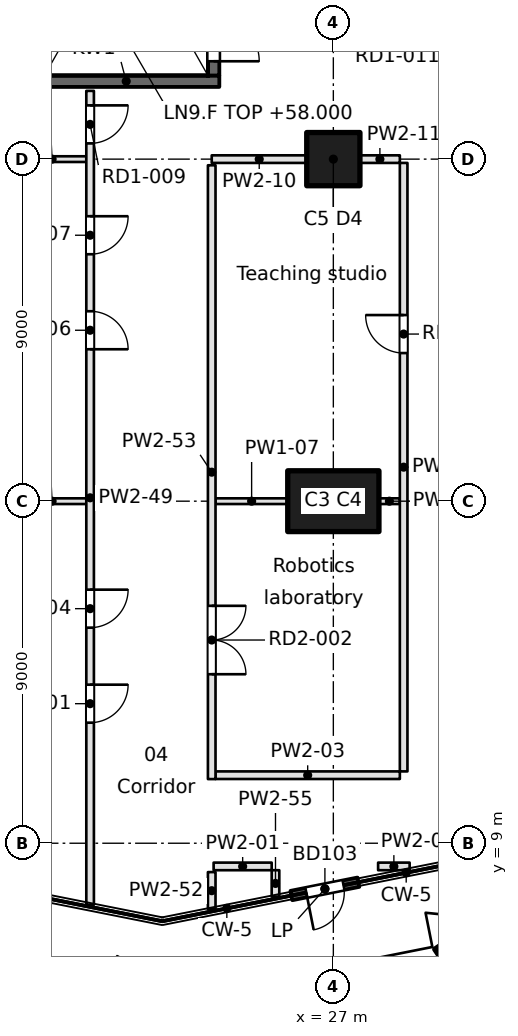
"""IFC4 building model, lengths in metres.
Left out: names, types, materials, properties, quantities, classifications, styles, units other than length and angle.
Written with IfcOpenShell. Run it as: python <this file> out.ifc"""

import sys

from ifc_helpers import new_model, si_unit, direction, frame, frame_2d, origin, origin_2d, place, context, subcontext, project, spatial, rectangle, extrude, element, fill, save


model = new_model("IFC4")
c1 = context("Model", 3, precision=1e-05, world=origin(), true_north=direction((0.0, 1.0)))
c2 = subcontext(c1, "Body", "Model", "MODEL_VIEW")
j1 = project(units=[si_unit("LENGTHUNIT", "METRE"), si_unit("PLANEANGLEUNIT", "RADIAN")], contexts=[c1])
p1 = place(None, origin())
s1 = spatial("IfcSite", under=j1, at=p1, CompositionType="ELEMENT")
p2 = place(p1, origin())
s2 = spatial("IfcBuilding", under=s1, at=p2, CompositionType="ELEMENT")
p3 = place(p2, frame((0.0, 0.0, 58.0)))
s3 = spatial("IfcBuildingStorey", under=s2, at=p3, CompositionType="ELEMENT", Elevation=58.0)
for number, where, z_axis, x_axis in (
    (1, (31.11, 6.213, 0.0), (0.0, 0.0, 1.0), (0.831, 0.556, 0.0)),
    (2, (27.0, 18.0, 0.0), (0.0, 0.0, 1.0), (1.0, 0.0, 0.0)),
):
    element("IfcColumn", number, at=place(p3, frame(where, z_axis=z_axis, x_axis=x_axis)), inside=s3, PredefinedType="COLUMN", context=c2, shape_type="SweptSolid", body=[
        extrude(rectangle(XDim=2.4, YDim=1.6, at=origin_2d()), origin(), (0.0, 0.0, 1.0), 3.7),
    ])
p4 = place(p3, frame((27.0, 27.0, 0.0), z_axis=(0.0, 0.0, 1.0), x_axis=(1.0, 0.0, 0.0)))
e3 = element("IfcColumn", 3, at=p4, inside=s3, PredefinedType="COLUMN", context=c2, shape_type="SweptSolid", body=[
    extrude(rectangle(XDim=1.4, YDim=1.4, at=origin_2d()), origin(), (0.0, 0.0, 1.0), 3.7),
])
p5 = place(p3, frame((25.896, 7.624, 0.0), z_axis=(0.0, 0.0, 1.0), x_axis=(0.980793982239, 0.195046569833, 0.0)))
e4 = element("IfcWall", 4, at=p5, inside=s3, PredefinedType="SOLIDWALL", context=c2, shape_type="SweptSolid", body=[
    extrude(rectangle(XDim=1.8, YDim=0.25, at=frame_2d((0.9, 0.0))), origin(), (0.0, 0.0, 1.0), 3.3),
])
p6 = place(p5, frame((0.4, 0.0, 0.0)))
e5 = element("IfcOpeningElement", 5, at=p6, cuts=e4, PredefinedType="OPENING", context=c2, shape_type="SweptSolid", body=[
    extrude(rectangle(XDim=1.0, YDim=2.1, at=frame_2d((0.5, 1.05))), frame((0.0, 0.125, 0.0), z_axis=(0.0, -1.0, 0.0), x_axis=(1.0, 0.0, 0.0)), (0.0, 0.0, 1.0), 0.25),
])
p7 = place(p3, frame((19.1, 29.05, -0.4), z_axis=(0.0, 0.0, 1.0), x_axis=(1.0, 0.0, 0.0)))
e6 = element("IfcWall", 6, at=p7, inside=s3, PredefinedType="SOLIDWALL", context=c2, shape_type="SweptSolid", body=[
    extrude(rectangle(XDim=4.9, YDim=0.3, at=frame_2d((2.45, 0.0))), origin(), (0.0, 0.0, 1.0), 3.7),
])
p8 = place(p3, frame((23.85, 29.2, -0.4), z_axis=(0.0, 0.0, 1.0), x_axis=(0.0, 1.0, 0.0)))
e7 = element("IfcWall", 7, at=p8, inside=s3, PredefinedType="SOLIDWALL", context=c2, shape_type="SweptSolid", body=[
    extrude(rectangle(XDim=7.6, YDim=0.3, at=frame_2d((3.8, 0.0))), origin(), (0.0, 0.0, 1.0), 3.7),
])
p9 = place(p8, frame((0.375, 0.0, 0.4)))
e8 = element("IfcOpeningElement", 8, at=p9, cuts=e7, PredefinedType="OPENING", context=c2, shape_type="SweptSolid", body=[
    extrude(rectangle(XDim=1.2, YDim=2.1, at=frame_2d((0.6, 1.05))), frame((0.0, 0.15, 0.0), z_axis=(0.0, -1.0, 0.0), x_axis=(1.0, 0.0, 0.0)), (0.0, 0.0, 1.0), 0.3),
])
p10 = place(p3, frame((25.378, 8.39, 0.0), z_axis=(0.0, 0.0, 1.0), x_axis=(-1.0, 0.0, 0.0)))
e9 = element("IfcWall", 9, at=p10, inside=s3, PredefinedType="PARTITIONING", context=c2, shape_type="SweptSolid", body=[
    extrude(rectangle(XDim=1.528, YDim=0.2, at=frame_2d((0.764, 0.0))), origin(), (0.0, 0.0, 1.0), 3.3),
])
p11 = place(p3, frame((29.008, 8.39, 0.0), z_axis=(0.0, 0.0, 1.0), x_axis=(-1.0, 0.0, 0.0)))
e10 = element("IfcWall", 10, at=p11, inside=s3, PredefinedType="PARTITIONING", context=c2, shape_type="SweptSolid", body=[
    extrude(rectangle(XDim=0.83, YDim=0.2, at=frame_2d((0.415, 0.0))), origin(), (0.0, 0.0, 1.0), 3.3),
])
p12 = place(p3, frame((23.9, 10.79, 0.0), z_axis=(0.0, 0.0, 1.0), x_axis=(1.0, 0.0, 0.0)))
e11 = element("IfcWall", 11, at=p12, inside=s3, PredefinedType="PARTITIONING", context=c2, shape_type="SweptSolid", body=[
    extrude(rectangle(XDim=4.85, YDim=0.2, at=frame_2d((2.425, 0.0))), origin(), (0.0, 0.0, 1.0), 3.3),
])
p13 = place(p3, frame((18.7, 18.0, 0.0), z_axis=(0.0, 0.0, 1.0), x_axis=(1.0, 0.0, 0.0)))
e12 = element("IfcWall", 12, at=p13, inside=s3, PredefinedType="PARTITIONING", context=c2, shape_type="SweptSolid", body=[
    extrude(rectangle(XDim=1.8, YDim=0.15, at=frame_2d((0.9, 0.0))), origin(), (0.0, 0.0, 1.0), 3.3),
])
p14 = place(p3, frame((23.9, 18.0, 0.0), z_axis=(0.0, 0.0, 1.0), x_axis=(1.0, 0.0, 0.0)))
e13 = element("IfcWall", 13, at=p14, inside=s3, PredefinedType="PARTITIONING", context=c2, shape_type="SweptSolid", body=[
    extrude(rectangle(XDim=1.9, YDim=0.15, at=frame_2d((0.95, 0.0))), origin(), (0.0, 0.0, 1.0), 3.3),
])
p15 = place(p3, frame((28.2, 18.0, 0.0), z_axis=(0.0, 0.0, 1.0), x_axis=(1.0, 0.0, 0.0)))
e14 = element("IfcWall", 14, at=p15, inside=s3, PredefinedType="PARTITIONING", context=c2, shape_type="SweptSolid", body=[
    extrude(rectangle(XDim=0.55, YDim=0.15, at=frame_2d((0.275, 0.0))), origin(), (0.0, 0.0, 1.0), 3.3),
])
p16 = place(p3, frame((26.3, 27.0, 0.0), z_axis=(0.0, 0.0, 1.0), x_axis=(-1.0, 0.0, 0.0)))
e15 = element("IfcWall", 15, at=p16, inside=s3, PredefinedType="PARTITIONING", context=c2, shape_type="SweptSolid", body=[
    extrude(rectangle(XDim=2.5, YDim=0.2, at=frame_2d((1.25, 0.0))), origin(), (0.0, 0.0, 1.0), 3.3),
])
p17 = place(p3, frame((28.75, 27.0, 0.0), z_axis=(0.0, 0.0, 1.0), x_axis=(-1.0, 0.0, 0.0)))
e16 = element("IfcWall", 16, at=p17, inside=s3, PredefinedType="PARTITIONING", context=c2, shape_type="SweptSolid", body=[
    extrude(rectangle(XDim=1.05, YDim=0.2, at=frame_2d((0.525, 0.0))), origin(), (0.0, 0.0, 1.0), 3.3),
])
p18 = place(p3, frame((18.7, 27.0, 0.0), z_axis=(0.0, 0.0, 1.0), x_axis=(1.0, 0.0, 0.0)))
e17 = element("IfcWall", 17, at=p18, inside=s3, PredefinedType="PARTITIONING", context=c2, shape_type="SweptSolid", body=[
    extrude(rectangle(XDim=1.8, YDim=0.15, at=frame_2d((0.9, 0.0))), origin(), (0.0, 0.0, 1.0), 3.3),
])
p19 = place(p3, frame((20.6, 7.381, 0.0), z_axis=(0.0, 0.0, 1.0), x_axis=(0.0, 1.0, 0.0)))
e18 = element("IfcWall", 18, at=p19, inside=s3, PredefinedType="PARTITIONING", context=c2, shape_type="SweptSolid", body=[
    extrude(rectangle(XDim=21.415, YDim=0.2, at=frame_2d((10.708, 0.0))), origin(), (0.0, 0.0, 1.0), 3.3),
])
p20 = place(p19, frame((4.791, 0.0, 0.0)))
e19 = element("IfcOpeningElement", 19, at=p20, cuts=e18, PredefinedType="OPENING", context=c2, shape_type="SweptSolid", body=[
    extrude(rectangle(XDim=1.0, YDim=2.1, at=frame_2d((0.5, 1.05))), frame((0.0, 0.1, 0.0), z_axis=(0.0, -1.0, 0.0), x_axis=(1.0, 0.0, 0.0)), (0.0, 0.0, 1.0), 0.2),
])
p21 = place(p19, frame((7.291, 0.0, 0.0)))
e20 = element("IfcOpeningElement", 20, at=p21, cuts=e18, PredefinedType="OPENING", context=c2, shape_type="SweptSolid", body=[
    extrude(rectangle(XDim=1.0, YDim=2.1, at=frame_2d((0.5, 1.05))), frame((0.0, 0.1, 0.0), z_axis=(0.0, -1.0, 0.0), x_axis=(1.0, 0.0, 0.0)), (0.0, 0.0, 1.0), 0.2),
])
p22 = place(p19, frame((14.616, 0.0, 0.0)))
e21 = element("IfcOpeningElement", 21, at=p22, cuts=e18, PredefinedType="OPENING", context=c2, shape_type="SweptSolid", body=[
    extrude(rectangle(XDim=1.0, YDim=2.1, at=frame_2d((0.5, 1.05))), frame((0.0, 0.1, 0.0), z_axis=(0.0, -1.0, 0.0), x_axis=(1.0, 0.0, 0.0)), (0.0, 0.0, 1.0), 0.2),
])
p23 = place(p19, frame((17.116, 0.0, 0.0)))
e22 = element("IfcOpeningElement", 22, at=p23, cuts=e18, PredefinedType="OPENING", context=c2, shape_type="SweptSolid", body=[
    extrude(rectangle(XDim=1.0, YDim=2.1, at=frame_2d((0.5, 1.05))), frame((0.0, 0.1, 0.0), z_axis=(0.0, -1.0, 0.0), x_axis=(1.0, 0.0, 0.0)), (0.0, 0.0, 1.0), 0.2),
])
p24 = place(p19, frame((20.033, 0.0, 0.0)))
e23 = element("IfcOpeningElement", 23, at=p24, cuts=e18, PredefinedType="OPENING", context=c2, shape_type="SweptSolid", body=[
    extrude(rectangle(XDim=1.0, YDim=2.1, at=frame_2d((0.5, 1.05))), frame((0.0, 0.1, 0.0), z_axis=(0.0, -1.0, 0.0), x_axis=(1.0, 0.0, 0.0)), (0.0, 0.0, 1.0), 0.2),
])
p25 = place(p3, frame((23.8, 8.24, 0.0), z_axis=(0.0, 0.0, 1.0), x_axis=(0.0, -1.0, 0.0)))
e24 = element("IfcWall", 24, at=p25, inside=s3, PredefinedType="PARTITIONING", context=c2, shape_type="SweptSolid", body=[
    extrude(rectangle(XDim=0.979, YDim=0.2, at=frame_2d((0.489, 0.0))), origin(), (0.0, 0.0, 1.0), 3.3),
])
p26 = place(p3, frame((23.8, 26.838, 0.0), z_axis=(0.0, 0.0, 1.0), x_axis=(0.0, -1.0, 0.0)))
e25 = element("IfcWall", 25, at=p26, inside=s3, PredefinedType="PARTITIONING", context=c2, shape_type="SweptSolid", body=[
    extrude(rectangle(XDim=16.151, YDim=0.2, at=frame_2d((8.075, 0.0))), origin(), (0.0, 0.0, 1.0), 3.3),
])
p27 = place(p26, frame((11.592, 0.0, 0.0)))
e26 = element("IfcOpeningElement", 26, at=p27, cuts=e25, PredefinedType="OPENING", context=c2, shape_type="SweptSolid", body=[
    extrude(rectangle(XDim=1.8, YDim=2.1, at=frame_2d((0.9, 1.05))), frame((0.0, 0.1, 0.0), z_axis=(0.0, -1.0, 0.0), x_axis=(1.0, 0.0, 0.0)), (0.0, 0.0, 1.0), 0.2),
])
p28 = place(p3, frame((25.478, 7.595, 0.0), z_axis=(0.0, 0.0, 1.0), x_axis=(0.0, 1.0, 0.0)))
e27 = element("IfcWall", 27, at=p28, inside=s3, PredefinedType="PARTITIONING", context=c2, shape_type="SweptSolid", body=[
    extrude(rectangle(XDim=0.695, YDim=0.2, at=frame_2d((0.347, 0.0))), origin(), (0.0, 0.0, 1.0), 3.3),
])
p29 = place(p3, frame((28.85, 10.89, 0.0), z_axis=(0.0, 0.0, 1.0), x_axis=(0.0, 1.0, 0.0)))
e28 = element("IfcWall", 28, at=p29, inside=s3, PredefinedType="PARTITIONING", context=c2, shape_type="SweptSolid", body=[
    extrude(rectangle(XDim=16.01, YDim=0.2, at=frame_2d((8.005, 0.0))), origin(), (0.0, 0.0, 1.0), 3.3),
])
p30 = place(p29, frame((11.007, 0.0, 0.0)))
e29 = element("IfcOpeningElement", 29, at=p30, cuts=e28, PredefinedType="OPENING", context=c2, shape_type="SweptSolid", body=[
    extrude(rectangle(XDim=1.0, YDim=2.1, at=frame_2d((0.5, 1.05))), frame((0.0, 0.1, 0.0), z_axis=(0.0, -1.0, 0.0), x_axis=(1.0, 0.0, 0.0)), (0.0, 0.0, 1.0), 0.2),
])
p31 = place(p6, frame((1.0, 0.0, 0.0), z_axis=(0.0, 0.0, 1.0), x_axis=(-1.0, 0.0, 0.0)))
e30 = element("IfcDoor", 30, at=p31, inside=s3, OperationType="SINGLE_SWING_RIGHT", PredefinedType="DOOR", context=c2, shape_type="SweptSolid", body=[
    extrude(rectangle(XDim=1.0, YDim=2.1, at=frame_2d((0.5, 1.05))), frame((0.0, 0.025, 0.0), z_axis=(0.0, -1.0, 0.0), x_axis=(1.0, 0.0, 0.0)), (0.0, 0.0, 1.0), 0.05),
])
fill(e5, e30)
p32 = place(p9, frame((1.2, 0.0, 0.0), z_axis=(0.0, 0.0, 1.0), x_axis=(-1.0, 0.0, 0.0)))
e31 = element("IfcDoor", 31, at=p32, inside=s3, OperationType="SINGLE_SWING_RIGHT", PredefinedType="DOOR", context=c2, shape_type="SweptSolid", body=[
    extrude(rectangle(XDim=1.2, YDim=2.1, at=frame_2d((0.6, 1.05))), frame((0.0, 0.025, 0.0), z_axis=(0.0, -1.0, 0.0), x_axis=(1.0, 0.0, 0.0)), (0.0, 0.0, 1.0), 0.05),
])
fill(e8, e31)
p33 = place(p20, frame((1.0, 0.0, 0.0), z_axis=(0.0, 0.0, 1.0), x_axis=(-1.0, 0.0, 0.0)))
e32 = element("IfcDoor", 32, at=p33, inside=s3, OperationType="SINGLE_SWING_LEFT", PredefinedType="DOOR", context=c2, shape_type="SweptSolid", body=[
    extrude(rectangle(XDim=1.0, YDim=2.1, at=frame_2d((0.5, 1.05))), frame((0.0, 0.025, 0.0), z_axis=(0.0, -1.0, 0.0), x_axis=(1.0, 0.0, 0.0)), (0.0, 0.0, 1.0), 0.05),
])
fill(e19, e32)
p34 = place(p27, origin())
e33 = element("IfcDoor", 33, at=p34, inside=s3, OperationType="DOUBLE_DOOR_SINGLE_SWING", PredefinedType="DOOR", context=c2, shape_type="SweptSolid", body=[
    extrude(rectangle(XDim=1.8, YDim=2.1, at=frame_2d((0.9, 1.05))), frame((0.0, 0.025, 0.0), z_axis=(0.0, -1.0, 0.0), x_axis=(1.0, 0.0, 0.0)), (0.0, 0.0, 1.0), 0.05),
])
fill(e26, e33)
p35 = place(p21, frame((1.0, 0.0, 0.0), z_axis=(0.0, 0.0, 1.0), x_axis=(-1.0, 0.0, 0.0)))
e34 = element("IfcDoor", 34, at=p35, inside=s3, OperationType="SINGLE_SWING_LEFT", PredefinedType="DOOR", context=c2, shape_type="SweptSolid", body=[
    extrude(rectangle(XDim=1.0, YDim=2.1, at=frame_2d((0.5, 1.05))), frame((0.0, 0.025, 0.0), z_axis=(0.0, -1.0, 0.0), x_axis=(1.0, 0.0, 0.0)), (0.0, 0.0, 1.0), 0.05),
])
fill(e20, e34)
p36 = place(p30, origin())
e35 = element("IfcDoor", 35, at=p36, inside=s3, OperationType="SINGLE_SWING_RIGHT", PredefinedType="DOOR", context=c2, shape_type="SweptSolid", body=[
    extrude(rectangle(XDim=1.0, YDim=2.1, at=frame_2d((0.5, 1.05))), frame((0.0, 0.025, 0.0), z_axis=(0.0, -1.0, 0.0), x_axis=(1.0, 0.0, 0.0)), (0.0, 0.0, 1.0), 0.05),
])
fill(e29, e35)
p37 = place(p22, frame((1.0, 0.0, 0.0), z_axis=(0.0, 0.0, 1.0), x_axis=(-1.0, 0.0, 0.0)))
e36 = element("IfcDoor", 36, at=p37, inside=s3, OperationType="SINGLE_SWING_RIGHT", PredefinedType="DOOR", context=c2, shape_type="SweptSolid", body=[
    extrude(rectangle(XDim=1.0, YDim=2.1, at=frame_2d((0.5, 1.05))), frame((0.0, 0.025, 0.0), z_axis=(0.0, -1.0, 0.0), x_axis=(1.0, 0.0, 0.0)), (0.0, 0.0, 1.0), 0.05),
])
fill(e21, e36)
p38 = place(p23, frame((1.0, 0.0, 0.0), z_axis=(0.0, 0.0, 1.0), x_axis=(-1.0, 0.0, 0.0)))
e37 = element("IfcDoor", 37, at=p38, inside=s3, OperationType="SINGLE_SWING_LEFT", PredefinedType="DOOR", context=c2, shape_type="SweptSolid", body=[
    extrude(rectangle(XDim=1.0, YDim=2.1, at=frame_2d((0.5, 1.05))), frame((0.0, 0.025, 0.0), z_axis=(0.0, -1.0, 0.0), x_axis=(1.0, 0.0, 0.0)), (0.0, 0.0, 1.0), 0.05),
])
fill(e22, e37)
p39 = place(p24, frame((1.0, 0.0, 0.0), z_axis=(0.0, 0.0, 1.0), x_axis=(-1.0, 0.0, 0.0)))
e38 = element("IfcDoor", 38, at=p39, inside=s3, OperationType="SINGLE_SWING_LEFT", PredefinedType="DOOR", context=c2, shape_type="SweptSolid", body=[
    extrude(rectangle(XDim=1.0, YDim=2.1, at=frame_2d((0.5, 1.05))), frame((0.0, 0.025, 0.0), z_axis=(0.0, -1.0, 0.0), x_axis=(1.0, 0.0, 0.0)), (0.0, 0.0, 1.0), 0.05),
])
fill(e23, e38)
save(model, sys.argv[1])
